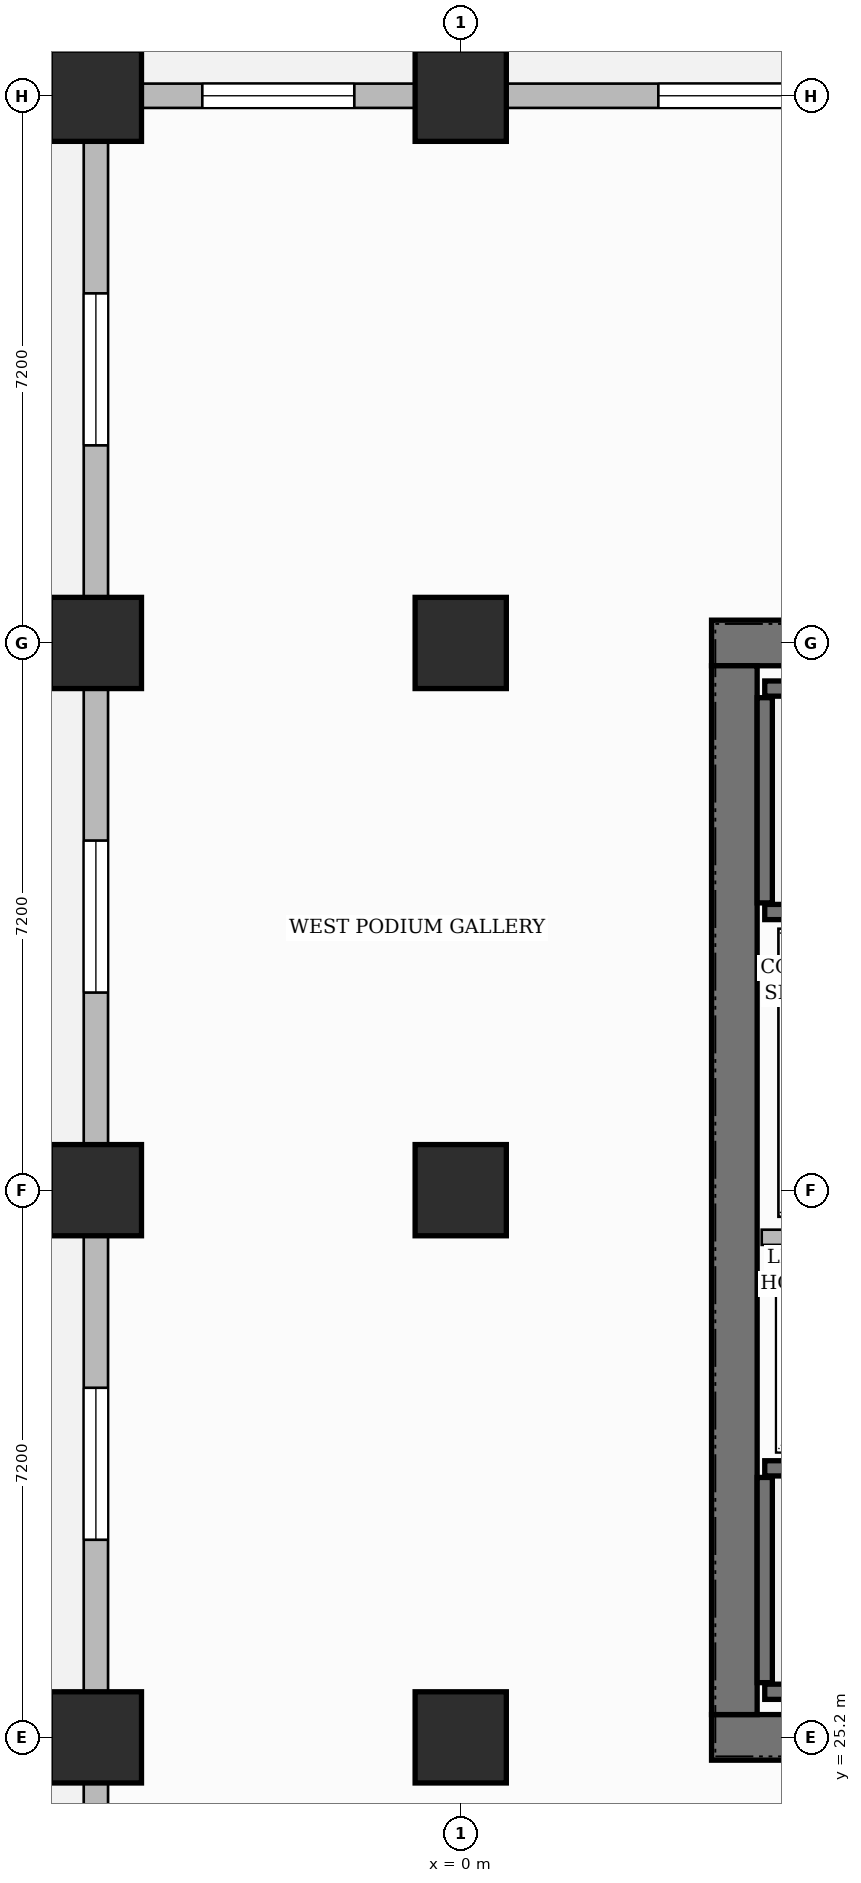
"""IFC4 building model, lengths in metres.
Left out: names, types, materials, properties, quantities, classifications, styles, units other than length and angle.
Written with IfcOpenShell. Run it as: python <this file> out.ifc"""

import sys

from ifc_helpers import new_model, si_unit, direction, frame, frame_2d, origin, origin_2d, place, context, subcontext, project, spatial, rectangle, extrude, source, transform, mapped, element, fill, save


model = new_model("IFC4")
c1 = context("Model", 3, precision=1e-05, world=origin(), true_north=direction((0.0, 1.0)))
c2 = subcontext(c1, "Body", "Model", "MODEL_VIEW")
j1 = project(units=[si_unit("LENGTHUNIT", "METRE"), si_unit("PLANEANGLEUNIT", "RADIAN")], contexts=[c1])
p1 = place(None, origin())
s1 = spatial("IfcSite", under=j1, at=p1, CompositionType="ELEMENT")
p2 = place(p1, origin())
s2 = spatial("IfcBuilding", under=s1, at=p2, CompositionType="ELEMENT")
p3 = place(p2, frame((0.0, 0.0, 16.2)))
s3 = spatial("IfcBuildingStorey", under=s2, at=p3, CompositionType="ELEMENT", Elevation=16.2)
for number, where, z_axis, x_axis in (
    (1, (3.3, 25.2, 0.0), (0.0, 0.0, 1.0), (1.0, 0.0, 0.0)),
    (2, (3.3, 39.6, 0.0), (0.0, 0.0, 1.0), (1.0, 0.0, 0.0)),
):
    element("IfcWall", number, at=place(p3, frame(where, z_axis=z_axis, x_axis=x_axis)), inside=s3, PredefinedType="SHEAR", context=c2, shape_type="SweptSolid", body=[
        extrude(rectangle(XDim=8.4, YDim=0.6, at=frame_2d((4.2, 0.0))), origin(), (0.0, 0.0, 1.0), 5.4),
    ])
p4 = place(p3, frame((3.6, 25.5, 0.0), z_axis=(0.0, 0.0, 1.0), x_axis=(0.0, 1.0, 0.0)))
e3 = element("IfcWall", 3, at=p4, inside=s3, PredefinedType="SHEAR", context=c2, shape_type="SweptSolid", body=[
    extrude(rectangle(XDim=13.8, YDim=0.6, at=frame_2d((6.9, 0.0))), origin(), (0.0, 0.0, 1.0), 5.4),
])
m1 = source(origin(), c2, "Body", "SweptSolid", [
    extrude(rectangle(XDim=1.2, YDim=1.2, at=origin_2d()), origin(), (0.0, 0.0, 1.0), 5.4),
])
for number, where, z_axis, x_axis in (
    (4, (-4.8, 25.2, 0.0), (0.0, 0.0, 1.0), (1.0, 0.0, 0.0)),
    (5, (-4.8, 32.4, 0.0), (0.0, 0.0, 1.0), (1.0, 0.0, 0.0)),
    (6, (-4.8, 39.6, 0.0), (0.0, 0.0, 1.0), (1.0, 0.0, 0.0)),
    (7, (-4.8, 46.8, 0.0), (0.0, 0.0, 1.0), (1.0, 0.0, 0.0)),
    (8, (0.0, 25.2, 0.0), (0.0, 0.0, 1.0), (1.0, 0.0, 0.0)),
    (9, (0.0, 32.4, 0.0), (0.0, 0.0, 1.0), (1.0, 0.0, 0.0)),
    (10, (0.0, 39.6, 0.0), (0.0, 0.0, 1.0), (1.0, 0.0, 0.0)),
    (11, (0.0, 46.8, 0.0), (0.0, 0.0, 1.0), (1.0, 0.0, 0.0)),
):
    element("IfcColumn", number, at=place(p3, frame(where, z_axis=z_axis, x_axis=x_axis)), inside=s3, PredefinedType="COLUMN", context=c2, shape_type="MappedRepresentation", body=[
        mapped(m1, transform((0.0, 0.0, 0.0), scale=1.0)),
    ])
p5 = place(p3, frame((4.0, 25.8, 0.0), z_axis=(0.0, 0.0, 1.0), x_axis=(1.0, 0.0, 0.0)))
e12 = element("IfcWall", 12, at=p5, inside=s3, PredefinedType="SHEAR", context=c2, shape_type="SweptSolid", body=[
    extrude(rectangle(XDim=7.1, YDim=0.2, at=frame_2d((3.55, 0.0))), origin(), (0.0, 0.0, 1.0), 5.4),
])
p6 = place(p3, frame((4.0, 25.92, 0.0), z_axis=(0.0, 0.0, 1.0), x_axis=(0.0, 1.0, 0.0)))
e13 = element("IfcWall", 13, at=p6, inside=s3, PredefinedType="SHEAR", context=c2, shape_type="SweptSolid", body=[
    extrude(rectangle(XDim=2.7, YDim=0.2, at=frame_2d((1.35, 0.0))), origin(), (0.0, 0.0, 1.0), 5.4),
])
p7 = place(p3, frame((4.0, 28.74, 0.0), z_axis=(0.0, 0.0, 1.0), x_axis=(1.0, 0.0, 0.0)))
e14 = element("IfcWall", 14, at=p7, inside=s3, PredefinedType="SHEAR", context=c2, shape_type="SweptSolid", body=[
    extrude(rectangle(XDim=7.1, YDim=0.2, at=frame_2d((3.55, 0.0))), origin(), (0.0, 0.0, 1.0), 5.4),
])
p8 = place(p7, frame((5.815, 0.0, 0.0)))
e15 = element("IfcOpeningElement", 15, at=p8, cuts=e14, PredefinedType="OPENING", context=c2, shape_type="SweptSolid", body=[
    extrude(rectangle(XDim=1.05, YDim=2.2, at=frame_2d((0.525, 1.1))), frame((0.0, 0.11, 0.0), z_axis=(0.0, -1.0, 0.0), x_axis=(1.0, 0.0, 0.0)), (0.0, 0.0, 1.0), 0.22),
])
p9 = place(p3, frame((4.0, 39.0, 0.0), z_axis=(0.0, 0.0, 1.0), x_axis=(1.0, 0.0, 0.0)))
e16 = element("IfcWall", 16, at=p9, inside=s3, PredefinedType="SHEAR", context=c2, shape_type="SweptSolid", body=[
    extrude(rectangle(XDim=7.1, YDim=0.2, at=frame_2d((3.55, 0.0))), origin(), (0.0, 0.0, 1.0), 5.4),
])
p10 = place(p3, frame((4.0, 36.18, 0.0), z_axis=(0.0, 0.0, 1.0), x_axis=(0.0, 1.0, 0.0)))
e17 = element("IfcWall", 17, at=p10, inside=s3, PredefinedType="SHEAR", context=c2, shape_type="SweptSolid", body=[
    extrude(rectangle(XDim=2.7, YDim=0.2, at=frame_2d((1.35, 0.0))), origin(), (0.0, 0.0, 1.0), 5.4),
])
p11 = place(p3, frame((4.0, 36.06, 0.0), z_axis=(0.0, 0.0, 1.0), x_axis=(1.0, 0.0, 0.0)))
e18 = element("IfcWall", 18, at=p11, inside=s3, PredefinedType="SHEAR", context=c2, shape_type="SweptSolid", body=[
    extrude(rectangle(XDim=7.1, YDim=0.2, at=frame_2d((3.55, 0.0))), origin(), (0.0, 0.0, 1.0), 5.4),
])
p12 = place(p11, frame((5.815, 0.0, 0.0)))
e19 = element("IfcOpeningElement", 19, at=p12, cuts=e18, PredefinedType="OPENING", context=c2, shape_type="SweptSolid", body=[
    extrude(rectangle(XDim=1.05, YDim=2.2, at=frame_2d((0.525, 1.1))), frame((0.0, 0.11, 0.0), z_axis=(0.0, -1.0, 0.0), x_axis=(1.0, 0.0, 0.0)), (0.0, 0.0, 1.0), 0.22),
])
p13 = place(p3, frame((3.96, 31.78, 0.0), z_axis=(0.0, 0.0, 1.0), x_axis=(1.0, 0.0, 0.0)))
e20 = element("IfcWall", 20, at=p13, inside=s3, PredefinedType="PARTITIONING", context=c2, shape_type="SweptSolid", body=[
    extrude(rectangle(XDim=2.13, YDim=0.2, at=frame_2d((1.065, 0.0))), origin(), (0.0, 0.0, 1.0), 5.1),
])
p14 = place(p3, frame((-4.8, 46.8, 0.0), z_axis=(0.0, 0.0, 1.0), x_axis=(1.0, 0.0, 0.0)))
e21 = element("IfcWall", 21, at=p14, inside=s3, PredefinedType="SOLIDWALL", context=c2, shape_type="SweptSolid", body=[
    extrude(rectangle(XDim=33.6, YDim=0.32, at=frame_2d((16.8, 0.0))), origin(), (0.0, 0.0, 1.0), 4.185),
])
p15 = place(p14, frame((1.4, 0.0, 0.75)))
e22 = element("IfcOpeningElement", 22, at=p15, cuts=e21, PredefinedType="OPENING", context=c2, shape_type="SweptSolid", body=[
    extrude(rectangle(XDim=2.0, YDim=2.6, at=frame_2d((1.0, 1.3))), frame((0.0, 0.17, 0.0), z_axis=(0.0, -1.0, 0.0), x_axis=(1.0, 0.0, 0.0)), (0.0, 0.0, 1.0), 0.34),
])
p16 = place(p14, frame((7.4, 0.0, 0.75)))
e23 = element("IfcOpeningElement", 23, at=p16, cuts=e21, PredefinedType="OPENING", context=c2, shape_type="SweptSolid", body=[
    extrude(rectangle(XDim=2.0, YDim=2.6, at=frame_2d((1.0, 1.3))), frame((0.0, 0.17, 0.0), z_axis=(0.0, -1.0, 0.0), x_axis=(1.0, 0.0, 0.0)), (0.0, 0.0, 1.0), 0.34),
])
p17 = place(p14, frame((14.6, 0.0, 0.75)))
e24 = element("IfcOpeningElement", 24, at=p17, cuts=e21, PredefinedType="OPENING", context=c2, shape_type="SweptSolid", body=[
    extrude(rectangle(XDim=2.0, YDim=2.6, at=frame_2d((1.0, 1.3))), frame((0.0, 0.17, 0.0), z_axis=(0.0, -1.0, 0.0), x_axis=(1.0, 0.0, 0.0)), (0.0, 0.0, 1.0), 0.34),
])
p18 = place(p14, frame((29.0, 0.0, 0.75)))
e25 = element("IfcOpeningElement", 25, at=p18, cuts=e21, PredefinedType="OPENING", context=c2, shape_type="SweptSolid", body=[
    extrude(rectangle(XDim=2.0, YDim=2.6, at=frame_2d((1.0, 1.3))), frame((0.0, 0.17, 0.0), z_axis=(0.0, -1.0, 0.0), x_axis=(1.0, 0.0, 0.0)), (0.0, 0.0, 1.0), 0.34),
])
p19 = place(p3, frame((-4.8, 0.05, 0.0), z_axis=(0.0, 0.0, 1.0), x_axis=(0.0, 1.0, 0.0)))
e26 = element("IfcWall", 26, at=p19, inside=s3, PredefinedType="SOLIDWALL", context=c2, shape_type="SweptSolid", body=[
    extrude(rectangle(XDim=46.7, YDim=0.32, at=frame_2d((23.35, 0.0))), origin(), (0.0, 0.0, 1.0), 4.185),
])
p20 = place(p19, frame((2.55, 0.0, 0.75)))
e27 = element("IfcOpeningElement", 27, at=p20, cuts=e26, PredefinedType="OPENING", context=c2, shape_type="SweptSolid", body=[
    extrude(rectangle(XDim=2.0, YDim=2.6, at=frame_2d((1.0, 1.3))), frame((0.0, 0.17, 0.0), z_axis=(0.0, -1.0, 0.0), x_axis=(1.0, 0.0, 0.0)), (0.0, 0.0, 1.0), 0.34),
])
p21 = place(p19, frame((9.75, 0.0, 0.75)))
e28 = element("IfcOpeningElement", 28, at=p21, cuts=e26, PredefinedType="OPENING", context=c2, shape_type="SweptSolid", body=[
    extrude(rectangle(XDim=2.0, YDim=2.6, at=frame_2d((1.0, 1.3))), frame((0.0, 0.17, 0.0), z_axis=(0.0, -1.0, 0.0), x_axis=(1.0, 0.0, 0.0)), (0.0, 0.0, 1.0), 0.34),
])
p22 = place(p19, frame((16.95, 0.0, 0.75)))
e29 = element("IfcOpeningElement", 29, at=p22, cuts=e26, PredefinedType="OPENING", context=c2, shape_type="SweptSolid", body=[
    extrude(rectangle(XDim=2.0, YDim=2.6, at=frame_2d((1.0, 1.3))), frame((0.0, 0.17, 0.0), z_axis=(0.0, -1.0, 0.0), x_axis=(1.0, 0.0, 0.0)), (0.0, 0.0, 1.0), 0.34),
])
p23 = place(p19, frame((27.75, 0.0, 0.75)))
e30 = element("IfcOpeningElement", 30, at=p23, cuts=e26, PredefinedType="OPENING", context=c2, shape_type="SweptSolid", body=[
    extrude(rectangle(XDim=2.0, YDim=2.6, at=frame_2d((1.0, 1.3))), frame((0.0, 0.17, 0.0), z_axis=(0.0, -1.0, 0.0), x_axis=(1.0, 0.0, 0.0)), (0.0, 0.0, 1.0), 0.34),
])
p24 = place(p19, frame((34.95, 0.0, 0.75)))
e31 = element("IfcOpeningElement", 31, at=p24, cuts=e26, PredefinedType="OPENING", context=c2, shape_type="SweptSolid", body=[
    extrude(rectangle(XDim=2.0, YDim=2.6, at=frame_2d((1.0, 1.3))), frame((0.0, 0.17, 0.0), z_axis=(0.0, -1.0, 0.0), x_axis=(1.0, 0.0, 0.0)), (0.0, 0.0, 1.0), 0.34),
])
p25 = place(p19, frame((42.15, 0.0, 0.75)))
e32 = element("IfcOpeningElement", 32, at=p25, cuts=e26, PredefinedType="OPENING", context=c2, shape_type="SweptSolid", body=[
    extrude(rectangle(XDim=2.0, YDim=2.6, at=frame_2d((1.0, 1.3))), frame((0.0, 0.17, 0.0), z_axis=(0.0, -1.0, 0.0), x_axis=(1.0, 0.0, 0.0)), (0.0, 0.0, 1.0), 0.34),
])
m2 = source(origin(), c2, "Body", "SweptSolid", [
    extrude(rectangle(XDim=2.0, YDim=2.6, at=frame_2d((1.0, 1.3))), frame((0.0, 0.03, 0.0), z_axis=(0.0, -1.0, 0.0), x_axis=(1.0, 0.0, 0.0)), (0.0, 0.0, 1.0), 0.06),
])
p26 = place(p15, origin())
e33 = element("IfcWindow", 33, at=p26, inside=s3, PartitioningType="DOUBLE_PANEL_VERTICAL", PredefinedType="WINDOW", context=c2, shape_type="MappedRepresentation", body=[
    mapped(m2, transform((0.0, 0.0, 0.0), scale=1.0)),
])
fill(e22, e33)
p27 = place(p16, origin())
e34 = element("IfcWindow", 34, at=p27, inside=s3, PartitioningType="DOUBLE_PANEL_VERTICAL", PredefinedType="WINDOW", context=c2, shape_type="MappedRepresentation", body=[
    mapped(m2, transform((0.0, 0.0, 0.0), scale=1.0)),
])
fill(e23, e34)
p28 = place(p23, origin())
e35 = element("IfcWindow", 35, at=p28, inside=s3, PartitioningType="DOUBLE_PANEL_VERTICAL", PredefinedType="WINDOW", context=c2, shape_type="MappedRepresentation", body=[
    mapped(m2, transform((0.0, 0.0, 0.0), scale=1.0)),
])
fill(e30, e35)
p29 = place(p24, origin())
e36 = element("IfcWindow", 36, at=p29, inside=s3, PartitioningType="DOUBLE_PANEL_VERTICAL", PredefinedType="WINDOW", context=c2, shape_type="MappedRepresentation", body=[
    mapped(m2, transform((0.0, 0.0, 0.0), scale=1.0)),
])
fill(e31, e36)
p30 = place(p25, origin())
e37 = element("IfcWindow", 37, at=p30, inside=s3, PartitioningType="DOUBLE_PANEL_VERTICAL", PredefinedType="WINDOW", context=c2, shape_type="MappedRepresentation", body=[
    mapped(m2, transform((0.0, 0.0, 0.0), scale=1.0)),
])
fill(e32, e37)
save(model, sys.argv[1])
